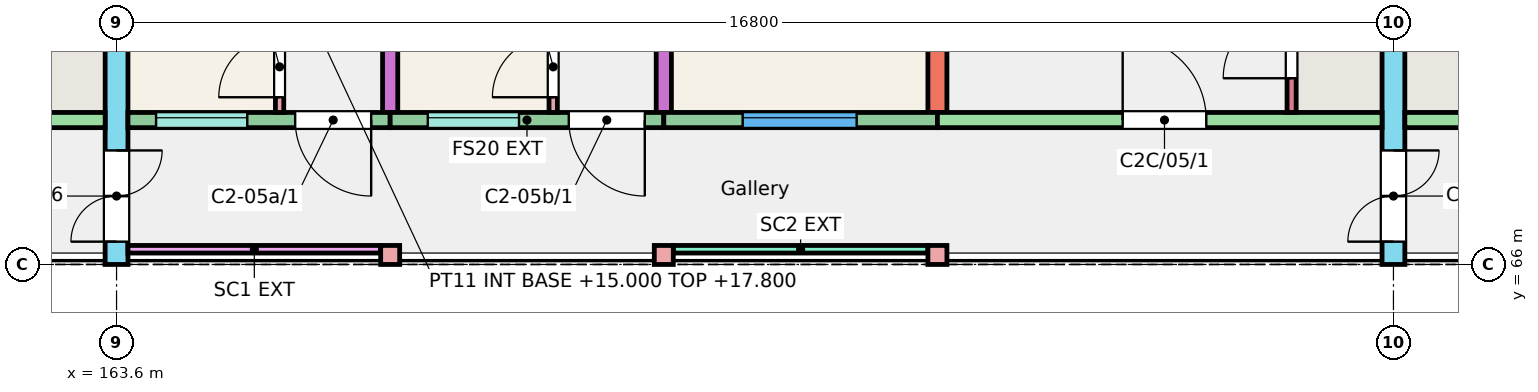
"""IFC4 building model, lengths in metres.
Left out: names, types, materials, properties, quantities, classifications, styles, units other than length and angle.
Written with IfcOpenShell. Run it as: python <this file> out.ifc"""

import sys

from ifc_helpers import new_model, si_unit, direction, frame, frame_2d, origin, origin_2d, place, context, subcontext, project, spatial, rectangle, extrude, element, fill, save


model = new_model("IFC4")
c1 = context("Model", 3, precision=1e-05, world=origin(), true_north=direction((0.0, 1.0)))
c2 = subcontext(c1, "Body", "Model", "MODEL_VIEW")
j1 = project(units=[si_unit("LENGTHUNIT", "METRE"), si_unit("PLANEANGLEUNIT", "RADIAN")], contexts=[c1])
p1 = place(None, origin())
s1 = spatial("IfcSite", under=j1, at=p1, CompositionType="ELEMENT")
p2 = place(p1, origin())
s2 = spatial("IfcBuilding", under=s1, at=p2, CompositionType="ELEMENT")
p3 = place(p2, frame((0.0, 0.0, 15.0)))
s3 = spatial("IfcBuildingStorey", under=s2, at=p3, CompositionType="ELEMENT", Elevation=15.0)
p4 = place(p3, frame((163.6, 66.0, 0.0), z_axis=(0.0, 0.0, 1.0), x_axis=(0.0, 1.0, 0.0)))
e1 = element("IfcWall", 1, at=p4, inside=s3, PredefinedType="SHEAR", context=c2, shape_type="SweptSolid", body=[
    extrude(rectangle(XDim=11.0, YDim=0.3, at=frame_2d((5.5, 0.0))), origin(), (0.0, 0.0, 1.0), 3.0),
])
p5 = place(p4, frame((0.3, 0.0, 0.0)))
e2 = element("IfcOpeningElement", 2, at=p5, cuts=e1, PredefinedType="OPENING", context=c2, shape_type="SweptSolid", body=[
    extrude(rectangle(XDim=1.2, YDim=2.1, at=frame_2d((0.6, 1.05))), frame((0.0, 0.16, 0.0), z_axis=(0.0, -1.0, 0.0), x_axis=(1.0, 0.0, 0.0)), (0.0, 0.0, 1.0), 0.32),
])
p6 = place(p3, frame((167.2, 68.0, 0.0), z_axis=(0.0, 0.0, 1.0), x_axis=(0.0, 1.0, 0.0)))
e3 = element("IfcWall", 3, at=p6, inside=s3, PredefinedType="SHEAR", context=c2, shape_type="SweptSolid", body=[
    extrude(rectangle(XDim=9.0, YDim=0.2, at=frame_2d((4.5, 0.0))), origin(), (0.0, 0.0, 1.0), 3.0),
])
p7 = place(p3, frame((170.8, 68.0, 0.0), z_axis=(0.0, 0.0, 1.0), x_axis=(0.0, 1.0, 0.0)))
e4 = element("IfcWall", 4, at=p7, inside=s3, PredefinedType="SHEAR", context=c2, shape_type="SweptSolid", body=[
    extrude(rectangle(XDim=9.0, YDim=0.2, at=frame_2d((4.5, 0.0))), origin(), (0.0, 0.0, 1.0), 3.0),
])
p8 = place(p7, frame((2.4, 0.0, 0.0)))
e5 = element("IfcOpeningElement", 5, at=p8, cuts=e4, PredefinedType="OPENING", context=c2, shape_type="SweptSolid", body=[
    extrude(rectangle(XDim=1.2, YDim=2.1, at=frame_2d((0.6, 1.05))), frame((0.0, 0.11, 0.0), z_axis=(0.0, -1.0, 0.0), x_axis=(1.0, 0.0, 0.0)), (0.0, 0.0, 1.0), 0.22),
])
p9 = place(p7, frame((6.4, 0.0, 0.0)))
e6 = element("IfcOpeningElement", 6, at=p9, cuts=e4, PredefinedType="OPENING", context=c2, shape_type="SweptSolid", body=[
    extrude(rectangle(XDim=1.2, YDim=2.1, at=frame_2d((0.6, 1.05))), frame((0.0, 0.11, 0.0), z_axis=(0.0, -1.0, 0.0), x_axis=(1.0, 0.0, 0.0)), (0.0, 0.0, 1.0), 0.22),
])
p10 = place(p3, frame((174.4, 68.0, 0.0), z_axis=(0.0, 0.0, 1.0), x_axis=(0.0, 1.0, 0.0)))
e7 = element("IfcWall", 7, at=p10, inside=s3, PredefinedType="SHEAR", context=c2, shape_type="SweptSolid", body=[
    extrude(rectangle(XDim=9.0, YDim=0.25, at=frame_2d((4.5, 0.0))), origin(), (0.0, 0.0, 1.0), 3.0),
])
p11 = place(p3, frame((180.4, 66.0, 0.0), z_axis=(0.0, 0.0, 1.0), x_axis=(0.0, 1.0, 0.0)))
e8 = element("IfcWall", 8, at=p11, inside=s3, PredefinedType="SHEAR", context=c2, shape_type="SweptSolid", body=[
    extrude(rectangle(XDim=11.0, YDim=0.3, at=frame_2d((5.5, 0.0))), origin(), (0.0, 0.0, 1.0), 3.0),
])
p12 = place(p11, frame((0.3, 0.0, 0.0)))
e9 = element("IfcOpeningElement", 9, at=p12, cuts=e8, PredefinedType="OPENING", context=c2, shape_type="SweptSolid", body=[
    extrude(rectangle(XDim=1.2, YDim=2.1, at=frame_2d((0.6, 1.05))), frame((0.0, 0.16, 0.0), z_axis=(0.0, -1.0, 0.0), x_axis=(1.0, 0.0, 0.0)), (0.0, 0.0, 1.0), 0.32),
])
p13 = place(p3, frame((157.6, 67.9, 0.0), z_axis=(0.0, 0.0, 1.0), x_axis=(1.0, 0.0, 0.0)))
e10 = element("IfcWall", 10, at=p13, inside=s3, PredefinedType="SHEAR", context=c2, shape_type="SweptSolid", body=[
    extrude(rectangle(XDim=5.85, YDim=0.2, at=frame_2d((2.925, 0.0))), origin(), (0.0, 0.0, 1.0), 3.0),
])
p14 = place(p13, frame((2.438, 0.0, 0.0)))
e11 = element("IfcOpeningElement", 11, at=p14, cuts=e10, PredefinedType="OPENING", context=c2, shape_type="SweptSolid", body=[
    extrude(rectangle(XDim=1.1, YDim=2.1, at=frame_2d((0.55, 1.05))), frame((0.0, 0.11, 0.0), z_axis=(0.0, -1.0, 0.0), x_axis=(1.0, 0.0, 0.0)), (0.0, 0.0, 1.0), 0.22),
])
p15 = place(p3, frame((163.75, 67.9, 0.0), z_axis=(0.0, 0.0, 1.0), x_axis=(1.0, 0.0, 0.0)))
e12 = element("IfcWall", 12, at=p15, inside=s3, PredefinedType="SOLIDWALL", context=c2, shape_type="SweptSolid", body=[
    extrude(rectangle(XDim=3.45, YDim=0.2, at=frame_2d((1.725, 0.0))), origin(), (0.0, 0.0, 1.0), 3.0),
])
p16 = place(p15, frame((0.37, 0.0, 1.1)))
e13 = element("IfcOpeningElement", 13, at=p16, cuts=e12, PredefinedType="OPENING", context=c2, shape_type="SweptSolid", body=[
    extrude(rectangle(XDim=1.2, YDim=1.3, at=frame_2d((0.6, 0.65))), frame((0.0, 0.11, 0.0), z_axis=(0.0, -1.0, 0.0), x_axis=(1.0, 0.0, 0.0)), (0.0, 0.0, 1.0), 0.22),
])
p17 = place(p15, frame((2.2, 0.0, 0.0)))
e14 = element("IfcOpeningElement", 14, at=p17, cuts=e12, PredefinedType="OPENING", context=c2, shape_type="SweptSolid", body=[
    extrude(rectangle(XDim=1.0, YDim=2.1, at=frame_2d((0.5, 1.05))), frame((0.0, 0.11, 0.0), z_axis=(0.0, -1.0, 0.0), x_axis=(1.0, 0.0, 0.0)), (0.0, 0.0, 1.0), 0.22),
])
p18 = place(p3, frame((167.2, 67.9, 0.0), z_axis=(0.0, 0.0, 1.0), x_axis=(1.0, 0.0, 0.0)))
e15 = element("IfcWall", 15, at=p18, inside=s3, PredefinedType="SOLIDWALL", context=c2, shape_type="SweptSolid", body=[
    extrude(rectangle(XDim=3.6, YDim=0.2, at=frame_2d((1.8, 0.0))), origin(), (0.0, 0.0, 1.0), 3.0),
])
p19 = place(p18, frame((0.495, 0.0, 1.1)))
e16 = element("IfcOpeningElement", 16, at=p19, cuts=e15, PredefinedType="OPENING", context=c2, shape_type="SweptSolid", body=[
    extrude(rectangle(XDim=1.2, YDim=1.3, at=frame_2d((0.6, 0.65))), frame((0.0, 0.11, 0.0), z_axis=(0.0, -1.0, 0.0), x_axis=(1.0, 0.0, 0.0)), (0.0, 0.0, 1.0), 0.22),
])
p20 = place(p18, frame((2.35, 0.0, 0.0)))
e17 = element("IfcOpeningElement", 17, at=p20, cuts=e15, PredefinedType="OPENING", context=c2, shape_type="SweptSolid", body=[
    extrude(rectangle(XDim=1.0, YDim=2.1, at=frame_2d((0.5, 1.05))), frame((0.0, 0.11, 0.0), z_axis=(0.0, -1.0, 0.0), x_axis=(1.0, 0.0, 0.0)), (0.0, 0.0, 1.0), 0.22),
])
p21 = place(p3, frame((170.8, 67.9, 0.0), z_axis=(0.0, 0.0, 1.0), x_axis=(1.0, 0.0, 0.0)))
e18 = element("IfcWall", 18, at=p21, inside=s3, PredefinedType="SOLIDWALL", context=c2, shape_type="SweptSolid", body=[
    extrude(rectangle(XDim=3.6, YDim=0.2, at=frame_2d((1.8, 0.0))), origin(), (0.0, 0.0, 1.0), 3.0),
])
p22 = place(p21, frame((1.038, 0.0, 0.9)))
e19 = element("IfcOpeningElement", 19, at=p22, cuts=e18, PredefinedType="OPENING", context=c2, shape_type="SweptSolid", body=[
    extrude(rectangle(XDim=1.5, YDim=1.5, at=frame_2d((0.75, 0.75))), frame((0.0, 0.11, 0.0), z_axis=(0.0, -1.0, 0.0), x_axis=(1.0, 0.0, 0.0)), (0.0, 0.0, 1.0), 0.22),
])
p23 = place(p3, frame((174.4, 67.9, 0.0), z_axis=(0.0, 0.0, 1.0), x_axis=(1.0, 0.0, 0.0)))
e20 = element("IfcWall", 20, at=p23, inside=s3, PredefinedType="SHEAR", context=c2, shape_type="SweptSolid", body=[
    extrude(rectangle(XDim=5.85, YDim=0.2, at=frame_2d((2.925, 0.0))), origin(), (0.0, 0.0, 1.0), 3.0),
])
p24 = place(p23, frame((2.438, 0.0, 0.0)))
e21 = element("IfcOpeningElement", 21, at=p24, cuts=e20, PredefinedType="OPENING", context=c2, shape_type="SweptSolid", body=[
    extrude(rectangle(XDim=1.1, YDim=2.1, at=frame_2d((0.55, 1.05))), frame((0.0, 0.11, 0.0), z_axis=(0.0, -1.0, 0.0), x_axis=(1.0, 0.0, 0.0)), (0.0, 0.0, 1.0), 0.22),
])
p25 = place(p3, frame((179.06, 68.0, 0.0), z_axis=(0.0, 0.0, 1.0), x_axis=(0.0, 1.0, 0.0)))
e22 = element("IfcWall", 22, at=p25, inside=s3, PredefinedType="SHEAR", context=c2, shape_type="SweptSolid", body=[
    extrude(rectangle(XDim=1.72, YDim=0.12, at=frame_2d((0.86, 0.0))), origin(), (0.0, 0.0, 1.0), 3.0),
])
p26 = place(p25, frame((0.45, 0.0, 0.0)))
e23 = element("IfcOpeningElement", 23, at=p26, cuts=e22, PredefinedType="OPENING", context=c2, shape_type="SweptSolid", body=[
    extrude(rectangle(XDim=0.9, YDim=2.1, at=frame_2d((0.45, 1.05))), frame((0.0, 0.07, 0.0), z_axis=(0.0, -1.0, 0.0), x_axis=(1.0, 0.0, 0.0)), (0.0, 0.0, 1.0), 0.14),
])
p27 = place(p3, frame((180.55, 67.9, 0.0), z_axis=(0.0, 0.0, 1.0), x_axis=(1.0, 0.0, 0.0)))
e24 = element("IfcWall", 24, at=p27, inside=s3, PredefinedType="SHEAR", context=c2, shape_type="SweptSolid", body=[
    extrude(rectangle(XDim=5.85, YDim=0.2, at=frame_2d((2.925, 0.0))), origin(), (0.0, 0.0, 1.0), 3.0),
])
p28 = place(p27, frame((2.312, 0.0, 0.0)))
e25 = element("IfcOpeningElement", 25, at=p28, cuts=e24, PredefinedType="OPENING", context=c2, shape_type="SweptSolid", body=[
    extrude(rectangle(XDim=1.1, YDim=2.1, at=frame_2d((0.55, 1.05))), frame((0.0, 0.11, 0.0), z_axis=(0.0, -1.0, 0.0), x_axis=(1.0, 0.0, 0.0)), (0.0, 0.0, 1.0), 0.22),
])
for number, where, z_axis, x_axis in (
    (26, (167.2, 66.125, 0.0), (0.0, 0.0, 1.0), (1.0, 0.0, 0.0)),
    (27, (170.8, 66.125, 0.0), (0.0, 0.0, 1.0), (1.0, 0.0, 0.0)),
    (28, (174.4, 66.125, 0.0), (0.0, 0.0, 1.0), (1.0, 0.0, 0.0)),
):
    element("IfcColumn", number, at=place(p3, frame(where, z_axis=z_axis, x_axis=x_axis)), inside=s3, PredefinedType="COLUMN", context=c2, shape_type="SweptSolid", body=[
        extrude(rectangle(XDim=0.25, YDim=0.25, at=origin_2d()), origin(), (0.0, 0.0, 1.0), 3.0),
    ])
p29 = place(p3, frame((163.75, 66.2, 0.0), z_axis=(0.0, 0.0, 1.0), x_axis=(1.0, 0.0, 0.0)))
e29 = element("IfcWall", 29, at=p29, inside=s3, PredefinedType="SOLIDWALL", context=c2, shape_type="SweptSolid", body=[
    extrude(rectangle(XDim=3.325, YDim=0.1, at=frame_2d((1.663, 0.0))), origin(), (0.0, 0.0, 1.0), 2.45),
])
p30 = place(p3, frame((170.925, 66.2, 0.0), z_axis=(0.0, 0.0, 1.0), x_axis=(1.0, 0.0, 0.0)))
e30 = element("IfcWall", 30, at=p30, inside=s3, PredefinedType="SOLIDWALL", context=c2, shape_type="SweptSolid", body=[
    extrude(rectangle(XDim=3.35, YDim=0.1, at=frame_2d((1.675, 0.0))), origin(), (0.0, 0.0, 1.0), 2.45),
])
p31 = place(p3, frame((165.745, 68.0, 0.0), z_axis=(0.0, 0.0, 1.0), x_axis=(0.0, 1.0, 0.0)))
e31 = element("IfcWall", 31, at=p31, inside=s3, PredefinedType="PARTITIONING", context=c2, shape_type="SweptSolid", body=[
    extrude(rectangle(XDim=4.3, YDim=0.11, at=frame_2d((2.15, 0.0))), origin(), (0.0, 0.0, 1.0), 2.8),
])
p32 = place(p31, frame((0.2, 0.0, 0.0)))
e32 = element("IfcOpeningElement", 32, at=p32, cuts=e31, PredefinedType="OPENING", context=c2, shape_type="SweptSolid", body=[
    extrude(rectangle(XDim=0.8, YDim=2.1, at=frame_2d((0.4, 1.05))), frame((0.0, 0.065, 0.0), z_axis=(0.0, -1.0, 0.0), x_axis=(1.0, 0.0, 0.0)), (0.0, 0.0, 1.0), 0.13),
])
p33 = place(p31, frame((3.35, 0.0, 0.0)))
e33 = element("IfcOpeningElement", 33, at=p33, cuts=e31, PredefinedType="OPENING", context=c2, shape_type="SweptSolid", body=[
    extrude(rectangle(XDim=0.8, YDim=2.1, at=frame_2d((0.4, 1.05))), frame((0.0, 0.065, 0.0), z_axis=(0.0, -1.0, 0.0), x_axis=(1.0, 0.0, 0.0)), (0.0, 0.0, 1.0), 0.13),
])
p34 = place(p3, frame((169.345, 68.0, 0.0), z_axis=(0.0, 0.0, 1.0), x_axis=(0.0, 1.0, 0.0)))
e34 = element("IfcWall", 34, at=p34, inside=s3, PredefinedType="PARTITIONING", context=c2, shape_type="SweptSolid", body=[
    extrude(rectangle(XDim=4.7, YDim=0.11, at=frame_2d((2.35, 0.0))), origin(), (0.0, 0.0, 1.0), 2.8),
])
p35 = place(p34, frame((0.2, 0.0, 0.0)))
e35 = element("IfcOpeningElement", 35, at=p35, cuts=e34, PredefinedType="OPENING", context=c2, shape_type="SweptSolid", body=[
    extrude(rectangle(XDim=0.8, YDim=2.1, at=frame_2d((0.4, 1.05))), frame((0.0, 0.065, 0.0), z_axis=(0.0, -1.0, 0.0), x_axis=(1.0, 0.0, 0.0)), (0.0, 0.0, 1.0), 0.13),
])
p36 = place(p34, frame((3.75, 0.0, 0.0)))
e36 = element("IfcOpeningElement", 36, at=p36, cuts=e34, PredefinedType="OPENING", context=c2, shape_type="SweptSolid", body=[
    extrude(rectangle(XDim=0.8, YDim=2.1, at=frame_2d((0.4, 1.05))), frame((0.0, 0.065, 0.0), z_axis=(0.0, -1.0, 0.0), x_axis=(1.0, 0.0, 0.0)), (0.0, 0.0, 1.0), 0.13),
])
p37 = place(p16, origin())
e37 = element("IfcWindow", 37, at=p37, inside=s3, PartitioningType="SINGLE_PANEL", PredefinedType="WINDOW", context=c2, shape_type="SweptSolid", body=[
    extrude(rectangle(XDim=1.2, YDim=1.3, at=frame_2d((0.6, 0.65))), frame((0.0, 0.06, 0.0), z_axis=(0.0, -1.0, 0.0), x_axis=(1.0, 0.0, 0.0)), (0.0, 0.0, 1.0), 0.06),
])
fill(e13, e37)
p38 = place(p22, origin())
e38 = element("IfcWindow", 38, at=p38, inside=s3, PartitioningType="SINGLE_PANEL", PredefinedType="WINDOW", context=c2, shape_type="SweptSolid", body=[
    extrude(rectangle(XDim=1.5, YDim=1.5, at=frame_2d((0.75, 0.75))), frame((0.0, 0.06, 0.0), z_axis=(0.0, -1.0, 0.0), x_axis=(1.0, 0.0, 0.0)), (0.0, 0.0, 1.0), 0.06),
])
fill(e19, e38)
p39 = place(p19, origin())
e39 = element("IfcWindow", 39, at=p39, inside=s3, PartitioningType="SINGLE_PANEL", PredefinedType="WINDOW", context=c2, shape_type="SweptSolid", body=[
    extrude(rectangle(XDim=1.2, YDim=1.3, at=frame_2d((0.6, 0.65))), frame((0.0, 0.06, 0.0), z_axis=(0.0, -1.0, 0.0), x_axis=(1.0, 0.0, 0.0)), (0.0, 0.0, 1.0), 0.06),
])
fill(e16, e39)
p40 = place(p17, origin())
e40 = element("IfcDoor", 40, at=p40, inside=s3, OperationType="SINGLE_SWING_RIGHT", PredefinedType="DOOR", context=c2, shape_type="SweptSolid", body=[
    extrude(rectangle(XDim=1.0, YDim=2.1, at=frame_2d((0.5, 1.05))), frame((0.0, 0.025, 0.0), z_axis=(0.0, -1.0, 0.0), x_axis=(1.0, 0.0, 0.0)), (0.0, 0.0, 1.0), 0.05),
])
fill(e14, e40)
p41 = place(p32, origin())
e41 = element("IfcDoor", 41, at=p41, inside=s3, OperationType="SINGLE_SWING_LEFT", PredefinedType="DOOR", context=c2, shape_type="SweptSolid", body=[
    extrude(rectangle(XDim=0.8, YDim=2.1, at=frame_2d((0.4, 1.05))), frame((0.0, 0.025, 0.0), z_axis=(0.0, -1.0, 0.0), x_axis=(1.0, 0.0, 0.0)), (0.0, 0.0, 1.0), 0.05),
])
fill(e32, e41)
p42 = place(p20, origin())
e42 = element("IfcDoor", 42, at=p42, inside=s3, OperationType="SINGLE_SWING_RIGHT", PredefinedType="DOOR", context=c2, shape_type="SweptSolid", body=[
    extrude(rectangle(XDim=1.0, YDim=2.1, at=frame_2d((0.5, 1.05))), frame((0.0, 0.025, 0.0), z_axis=(0.0, -1.0, 0.0), x_axis=(1.0, 0.0, 0.0)), (0.0, 0.0, 1.0), 0.05),
])
fill(e17, e42)
p43 = place(p35, origin())
e43 = element("IfcDoor", 43, at=p43, inside=s3, OperationType="SINGLE_SWING_LEFT", PredefinedType="DOOR", context=c2, shape_type="SweptSolid", body=[
    extrude(rectangle(XDim=0.8, YDim=2.1, at=frame_2d((0.4, 1.05))), frame((0.0, 0.025, 0.0), z_axis=(0.0, -1.0, 0.0), x_axis=(1.0, 0.0, 0.0)), (0.0, 0.0, 1.0), 0.05),
])
fill(e35, e43)
p44 = place(p24, origin())
e44 = element("IfcDoor", 44, at=p44, inside=s3, OperationType="SINGLE_SWING_LEFT", PredefinedType="DOOR", context=c2, shape_type="SweptSolid", body=[
    extrude(rectangle(XDim=1.1, YDim=2.1, at=frame_2d((0.55, 1.05))), frame((0.0, 0.025, 0.0), z_axis=(0.0, -1.0, 0.0), x_axis=(1.0, 0.0, 0.0)), (0.0, 0.0, 1.0), 0.05),
])
fill(e21, e44)
p45 = place(p26, origin())
e45 = element("IfcDoor", 45, at=p45, inside=s3, OperationType="SINGLE_SWING_LEFT", PredefinedType="DOOR", context=c2, shape_type="SweptSolid", body=[
    extrude(rectangle(XDim=0.9, YDim=2.1, at=frame_2d((0.45, 1.05))), frame((0.0, 0.025, 0.0), z_axis=(0.0, -1.0, 0.0), x_axis=(1.0, 0.0, 0.0)), (0.0, 0.0, 1.0), 0.05),
])
fill(e23, e45)
p46 = place(p5, origin())
e46 = element("IfcDoor", 46, at=p46, inside=s3, OperationType="DOUBLE_DOOR_SINGLE_SWING", PredefinedType="DOOR", context=c2, shape_type="SweptSolid", body=[
    extrude(rectangle(XDim=1.2, YDim=2.1, at=frame_2d((0.6, 1.05))), frame((0.0, 0.025, 0.0), z_axis=(0.0, -1.0, 0.0), x_axis=(1.0, 0.0, 0.0)), (0.0, 0.0, 1.0), 0.05),
])
fill(e2, e46)
p47 = place(p12, origin())
e47 = element("IfcDoor", 47, at=p47, inside=s3, OperationType="DOUBLE_DOOR_SINGLE_SWING", PredefinedType="DOOR", context=c2, shape_type="SweptSolid", body=[
    extrude(rectangle(XDim=1.2, YDim=2.1, at=frame_2d((0.6, 1.05))), frame((0.0, 0.025, 0.0), z_axis=(0.0, -1.0, 0.0), x_axis=(1.0, 0.0, 0.0)), (0.0, 0.0, 1.0), 0.05),
])
fill(e9, e47)
save(model, sys.argv[1])
